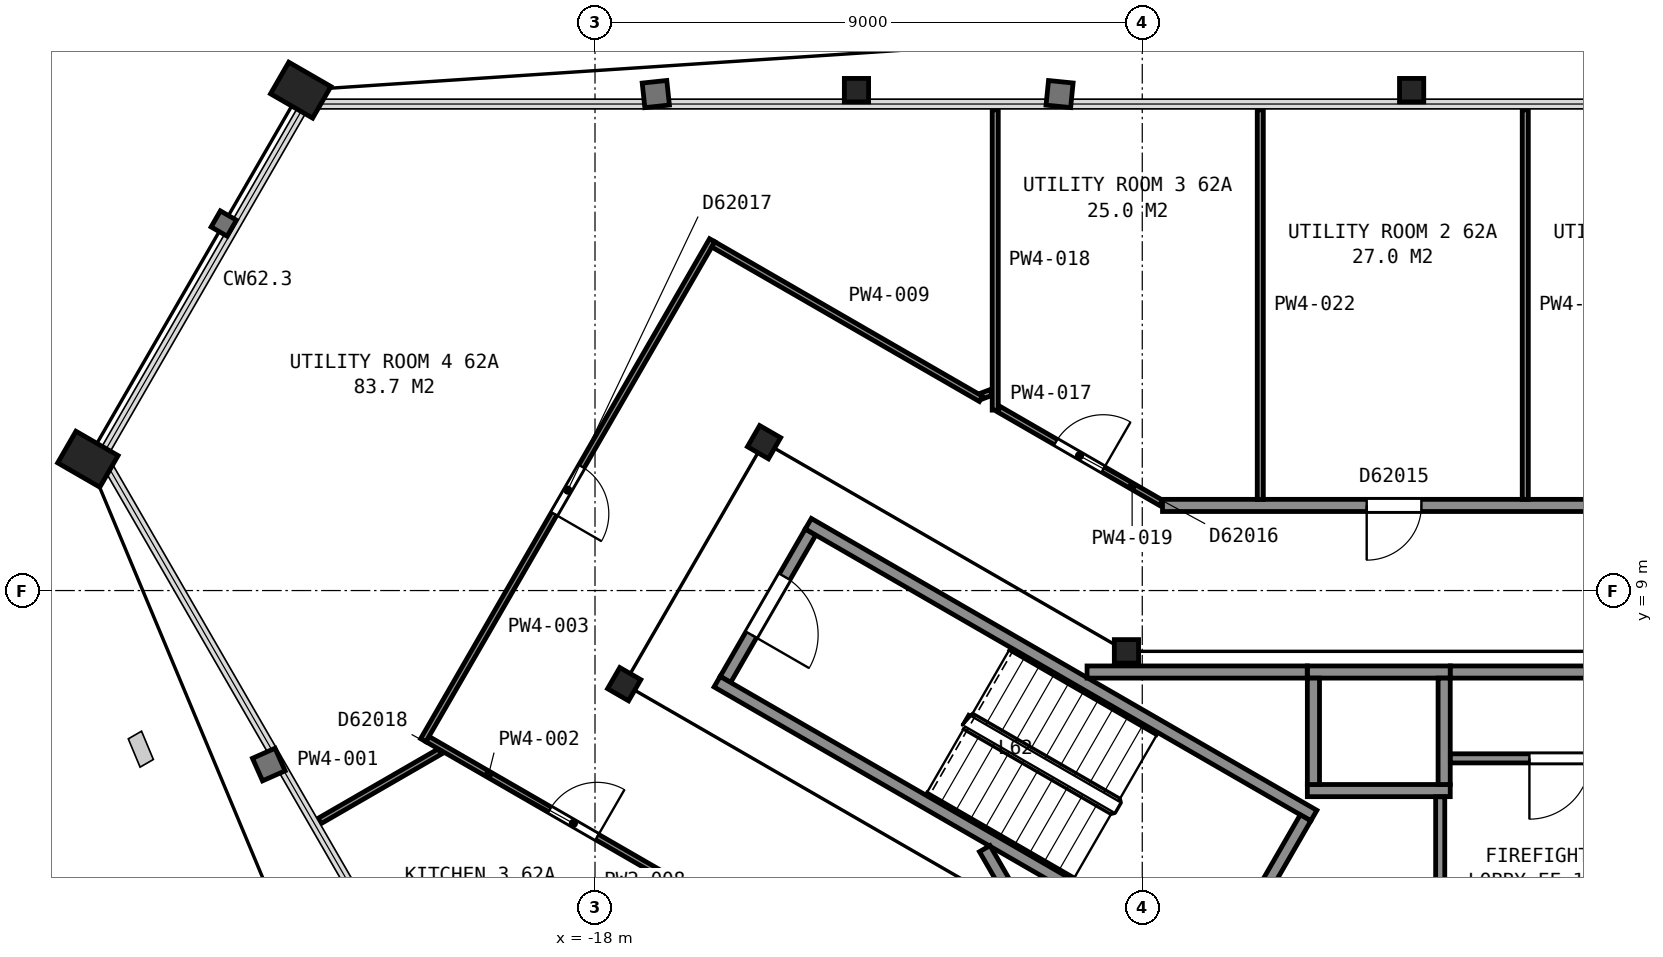
"""IFC4 building model, lengths in metres.
Left out: names, types, materials, properties, quantities, classifications, styles, units other than length and angle.
Written with IfcOpenShell. Run it as: python <this file> out.ifc"""

import sys

from ifc_helpers import new_model, si_unit, direction, frame, frame_2d, origin, origin_2d, place, context, subcontext, project, spatial, rectangle, hollow_rectangle, i_section, extrude, element, fill, save


model = new_model("IFC4")
c1 = context("Model", 3, precision=1e-05, world=origin(), true_north=direction((0.0, 1.0)))
c2 = subcontext(c1, "Body", "Model", "MODEL_VIEW")
j1 = project(units=[si_unit("LENGTHUNIT", "METRE"), si_unit("PLANEANGLEUNIT", "RADIAN")], contexts=[c1])
p1 = place(None, origin())
s1 = spatial("IfcSite", under=j1, at=p1, CompositionType="ELEMENT")
p2 = place(p1, origin())
s2 = spatial("IfcBuilding", under=s1, at=p2, CompositionType="ELEMENT")
p3 = place(p2, frame((0.0, 0.0, 247.1)))
s3 = spatial("IfcBuildingStorey", under=s2, at=p3, CompositionType="ELEMENT", Elevation=247.1)
for number, where, z_axis, x_axis in (
    (1, (-4.57, 17.23, 0.035), (0.0, 0.0, 1.0), (1.0, 0.0, 0.0)),
    (2, (-13.7, 17.23, 0.035), (0.0, 0.0, 1.0), (1.0, 0.0, 0.0)),
):
    element("IfcColumn", number, at=place(p3, frame(where, z_axis=z_axis, x_axis=x_axis)), inside=s3, PredefinedType="COLUMN", context=c2, shape_type="SweptSolid", body=[
        extrude(i_section(OverallWidth=0.399, OverallDepth=0.386, WebThickness=0.021, FlangeThickness=0.033, FilletRadius=0.015, at=origin_2d()), origin(), (0.0, 0.0, 1.0), 3.665),
    ])
for number, where, z_axis, x_axis in (
    (3, (-22.84, 17.23, 0.065), (0.0, 0.0, 1.0), (0.5, 0.866, 0.0)),
    (4, (-26.34, 11.16, 0.065), (0.0, 0.0, 1.0), (0.5, 0.866, 0.0)),
):
    element("IfcColumn", number, at=place(p3, frame(where, z_axis=z_axis, x_axis=x_axis)), inside=s3, PredefinedType="COLUMN", context=c2, shape_type="SweptSolid", body=[
        extrude(hollow_rectangle(XDim=0.6, YDim=0.8, WallThickness=0.05, at=origin_2d()), origin(), (0.0, 0.0, 1.0), 3.635),
    ])
p4 = place(p3, frame((-9.26, 8.0, 0.0), z_axis=(0.0, 0.0, 1.0), x_axis=(1.0, 0.0, 0.0)))
e5 = element("IfcColumn", 5, at=p4, inside=s3, PredefinedType="COLUMN", context=c2, shape_type="SweptSolid", body=[
    extrude(i_section(OverallWidth=0.399, OverallDepth=0.386, WebThickness=0.021, FlangeThickness=0.033, FilletRadius=0.015, at=origin_2d()), origin(), (0.0, 0.0, 1.0), 3.7),
])
for number, where, z_axis, x_axis in (
    (6, (-15.22, 11.44, 0.0), (0.0, 0.0, 1.0), (0.5, 0.866, 0.0)),
    (7, (-17.52, 7.46, 0.0), (0.0, 0.0, 1.0), (0.5, 0.866, 0.0)),
):
    element("IfcColumn", number, at=place(p3, frame(where, z_axis=z_axis, x_axis=x_axis)), inside=s3, PredefinedType="COLUMN", context=c2, shape_type="SweptSolid", body=[
        extrude(i_section(OverallWidth=0.401, OverallDepth=0.399, WebThickness=0.025, FlangeThickness=0.04, FilletRadius=0.015, at=origin_2d()), origin(), (0.0, 0.0, 1.0), 3.7),
    ])
p5 = place(p3, frame((-14.455, 9.962, 0.0), z_axis=(0.0, 0.0, 1.0), x_axis=(-0.500049511043, -0.865996816683, 0.0)))
e8 = element("IfcWall", 8, at=p5, inside=s3, PredefinedType="PARTITIONING", context=c2, shape_type="SweptSolid", body=[
    extrude(rectangle(XDim=2.8, YDim=0.2, at=frame_2d((1.4, 0.0))), origin(), (0.0, 0.0, 1.0), 3.45),
])
p6 = place(p5, frame((0.85, 0.0, 0.0)))
e9 = element("IfcOpeningElement", 9, at=p6, cuts=e8, PredefinedType="OPENING", context=c2, shape_type="SweptSolid", body=[
    extrude(rectangle(XDim=1.1, YDim=2.1, at=frame_2d((0.55, 1.05))), frame((0.0, 0.11, 0.0), z_axis=(0.0, -1.0, 0.0), x_axis=(1.0, 0.0, 0.0)), (0.0, 0.0, 1.0), 0.22),
])
for number, where, z_axis, x_axis in (
    (10, (-7.678, 2.701, 0.0), (0.0, 0.0, 1.0), (-0.866, 0.5, 0.0)),
    (11, (-6.178, 5.299, 0.0), (0.0, 0.0, 1.0), (-0.866, 0.5, 0.0)),
):
    element("IfcWall", number, at=place(p3, frame(where, z_axis=z_axis, x_axis=x_axis)), inside=s3, PredefinedType="PARTITIONING", context=c2, shape_type="SweptSolid", body=[
        extrude(rectangle(XDim=9.6, YDim=0.2, at=frame_2d((4.8, 0.0))), origin(), (0.0, 0.0, 1.0), 3.45),
    ])
p7 = place(p3, frame((-6.315, 5.262, 0.0), z_axis=(0.0, 0.0, 1.0), x_axis=(-0.500049511043, -0.865996816683, 0.0)))
e12 = element("IfcWall", 12, at=p7, inside=s3, PredefinedType="PARTITIONING", context=c2, shape_type="SweptSolid", body=[
    extrude(rectangle(XDim=2.8, YDim=0.2, at=frame_2d((1.4, 0.0))), origin(), (0.0, 0.0, 1.0), 3.45),
])
for number, where, z_axis, x_axis in (
    (13, (-6.285, 5.71, 0.0), (0.0, 0.0, 1.0), (1.0, 0.0, 0.0)),
    (14, (-6.285, 7.66, 0.0), (0.0, 0.0, 1.0), (1.0, 0.0, 0.0)),
):
    element("IfcWall", number, at=place(p3, frame(where, z_axis=z_axis, x_axis=x_axis)), inside=s3, PredefinedType="PARTITIONING", context=c2, shape_type="SweptSolid", body=[
        extrude(rectangle(XDim=2.35, YDim=0.2, at=frame_2d((1.175, 0.0))), origin(), (0.0, 0.0, 1.0), 3.7),
    ])
for number, where, z_axis, x_axis in (
    (15, (-4.035, 5.81, 0.0), (0.0, 0.0, 1.0), (0.0, 1.0, 0.0)),
    (16, (-6.185, 5.81, 0.0), (0.0, 0.0, 1.0), (0.0, 1.0, 0.0)),
):
    element("IfcWall", number, at=place(p3, frame(where, z_axis=z_axis, x_axis=x_axis)), inside=s3, PredefinedType="PARTITIONING", context=c2, shape_type="SweptSolid", body=[
        extrude(rectangle(XDim=1.75, YDim=0.2, at=frame_2d((0.875, 0.0))), origin(), (0.0, 0.0, 1.0), 3.7),
    ])
p8 = place(p3, frame((-11.591, 4.755, 0.0), z_axis=(0.0, 0.0, 1.0), x_axis=(0.500043977787, -0.866000011708, 0.0)))
e17 = element("IfcWall", 17, at=p8, inside=s3, PredefinedType="PARTITIONING", context=c2, shape_type="SweptSolid", body=[
    extrude(rectangle(XDim=6.617, YDim=0.2, at=frame_2d((3.308, 0.0))), origin(), (0.0, 0.0, 1.0), 3.45),
])
p9 = place(p8, frame((3.695, 0.0, 0.0)))
e18 = element("IfcOpeningElement", 18, at=p9, cuts=e17, PredefinedType="OPENING", context=c2, shape_type="SweptSolid", body=[
    extrude(rectangle(XDim=1.8, YDim=2.1, at=frame_2d((0.9, 1.05))), frame((0.0, 0.11, 0.0), z_axis=(0.0, -1.0, 0.0), x_axis=(1.0, 0.0, 0.0)), (0.0, 0.0, 1.0), 0.22),
])
p10 = place(p3, frame((-9.908, 7.66, 0.0), z_axis=(0.0, 0.0, 1.0), x_axis=(1.0, 0.0, 0.0)))
e19 = element("IfcWall", 19, at=p10, inside=s3, PredefinedType="PARTITIONING", context=c2, shape_type="SweptSolid", body=[
    extrude(rectangle(XDim=3.621, YDim=0.2, at=frame_2d((1.811, 0.0))), origin(), (0.0, 0.0, 1.0), 3.45),
])
p11 = place(p3, frame((-4.1, 2.085, 0.0), z_axis=(0.0, 0.0, 1.0), x_axis=(0.0, 1.0, 0.0)))
e20 = element("IfcWall", 20, at=p11, inside=s3, PredefinedType="PARTITIONING", context=c2, shape_type="SweptSolid", body=[
    extrude(rectangle(XDim=3.523, YDim=0.15, at=frame_2d((1.761, 0.0))), origin(), (0.0, 0.0, 1.0), 3.45),
])
p12 = place(p3, frame((-3.933, 6.24, 0.0), z_axis=(0.0, 0.0, 1.0), x_axis=(1.0, 0.0, 0.0)))
e21 = element("IfcWall", 21, at=p12, inside=s3, PredefinedType="PARTITIONING", context=c2, shape_type="SweptSolid", body=[
    extrude(rectangle(XDim=3.538, YDim=0.15, at=frame_2d((1.769, 0.0))), origin(), (0.0, 0.0, 1.0), 3.45),
])
p13 = place(p12, frame((1.3, 0.0, 0.0)))
e22 = element("IfcOpeningElement", 22, at=p13, cuts=e21, PredefinedType="OPENING", context=c2, shape_type="SweptSolid", body=[
    extrude(rectangle(XDim=1.0, YDim=2.1, at=frame_2d((0.5, 1.05))), frame((0.0, 0.085, 0.0), z_axis=(0.0, -1.0, 0.0), x_axis=(1.0, 0.0, 0.0)), (0.0, 0.0, 1.0), 0.17),
])
p14 = place(p3, frame((-3.933, 7.66, 0.0), z_axis=(0.0, 0.0, 1.0), x_axis=(1.0, 0.0, 0.0)))
e23 = element("IfcWall", 23, at=p14, inside=s3, PredefinedType="PARTITIONING", context=c2, shape_type="SweptSolid", body=[
    extrude(rectangle(XDim=13.841, YDim=0.2, at=frame_2d((6.92, 0.0))), origin(), (0.0, 0.0, 1.0), 3.45),
])
p15 = place(p3, frame((-22.53, 5.21, 0.0), z_axis=(0.0, 0.0, 1.0), x_axis=(0.865865073245, 0.500277597875, 0.0)))
e24 = element("IfcWall", 24, at=p15, inside=s3, PredefinedType="PARTITIONING", context=c2, shape_type="SweptSolid", body=[
    extrude(rectangle(XDim=2.284, YDim=0.1, at=frame_2d((1.142, 0.0))), origin(), (0.0, 0.0, 1.0), 2.713),
])
p16 = place(p3, frame((-16.253, 3.957, 0.0), z_axis=(0.0, 0.0, 1.0), x_axis=(-0.866006514596, 0.500032715607, 0.0)))
e25 = element("IfcWall", 25, at=p16, inside=s3, PredefinedType="PARTITIONING", context=c2, shape_type="SweptSolid", body=[
    extrude(rectangle(XDim=5.199, YDim=0.1, at=frame_2d((2.6, 0.0))), origin(), (0.0, 0.0, 1.0), 2.713),
])
p17 = place(p16, frame((1.978, 0.0, 0.0)))
e26 = element("IfcOpeningElement", 26, at=p17, cuts=e25, PredefinedType="OPENING", context=c2, shape_type="SweptSolid", body=[
    extrude(rectangle(XDim=0.9, YDim=2.1, at=frame_2d((0.45, 1.05))), frame((0.0, 0.06, 0.0), z_axis=(0.0, -1.0, 0.0), x_axis=(1.0, 0.0, 0.0)), (0.0, 0.0, 1.0), 0.12),
])
p18 = place(p3, frame((-20.824, 6.539, 0.0), z_axis=(0.0, 0.0, 1.0), x_axis=(0.500297300687, 0.865853689098, 0.0)))
e27 = element("IfcWall", 27, at=p18, inside=s3, PredefinedType="PARTITIONING", context=c2, shape_type="SweptSolid", body=[
    extrude(rectangle(XDim=9.496, YDim=0.1, at=frame_2d((4.748, 0.0))), origin(), (0.0, 0.0, 1.0), 2.713),
])
p19 = place(p18, frame((4.3, 0.0, 0.0)))
e28 = element("IfcOpeningElement", 28, at=p19, cuts=e27, PredefinedType="OPENING", context=c2, shape_type="SweptSolid", body=[
    extrude(rectangle(XDim=0.9, YDim=2.1, at=frame_2d((0.45, 1.05))), frame((0.0, 0.06, 0.0), z_axis=(0.0, -1.0, 0.0), x_axis=(1.0, 0.0, 0.0)), (0.0, 0.0, 1.0), 0.12),
])
p20 = place(p3, frame((-16.055, 14.693, 0.0), z_axis=(0.0, 0.0, 1.0), x_axis=(0.866094383736, -0.499880504182, 0.0)))
e29 = element("IfcWall", 29, at=p20, inside=s3, PredefinedType="PARTITIONING", context=c2, shape_type="SweptSolid", body=[
    extrude(rectangle(XDim=5.081, YDim=0.1, at=frame_2d((2.541, 0.0))), origin(), (0.0, 0.0, 1.0), 2.713),
])
p21 = place(p3, frame((-11.632, 12.203, 0.0), z_axis=(0.0, 0.0, 1.0), x_axis=(0.934710776834, 0.355409290354, 0.0)))
e30 = element("IfcWall", 30, at=p21, inside=s3, PredefinedType="PARTITIONING", context=c2, shape_type="SweptSolid", body=[
    extrude(rectangle(XDim=0.156, YDim=0.1, at=frame_2d((0.078, 0.0))), origin(), (0.0, 0.0, 1.0), 2.713),
])
p22 = place(p3, frame((-11.418, 11.967, 0.0), z_axis=(0.0, 0.0, 1.0), x_axis=(0.0, 1.0, 0.0)))
e31 = element("IfcWall", 31, at=p22, inside=s3, PredefinedType="PARTITIONING", context=c2, shape_type="SweptSolid", body=[
    extrude(rectangle(XDim=4.939, YDim=0.1, at=frame_2d((2.469, 0.0))), origin(), (0.0, 0.0, 1.0), 2.713),
])
p23 = place(p3, frame((-11.357, 11.982, 0.0), z_axis=(0.0, 0.0, 1.0), x_axis=(0.866039032844, -0.499976393034, 0.0)))
e32 = element("IfcWall", 32, at=p23, inside=s3, PredefinedType="PARTITIONING", context=c2, shape_type="SweptSolid", body=[
    extrude(rectangle(XDim=3.079, YDim=0.1, at=frame_2d((1.54, 0.0))), origin(), (0.0, 0.0, 1.0), 2.713),
])
p24 = place(p23, frame((1.08, 0.0, 0.0)))
e33 = element("IfcOpeningElement", 33, at=p24, cuts=e32, PredefinedType="OPENING", context=c2, shape_type="SweptSolid", body=[
    extrude(rectangle(XDim=0.9, YDim=2.1, at=frame_2d((0.45, 1.05))), frame((0.0, 0.06, 0.0), z_axis=(0.0, -1.0, 0.0), x_axis=(1.0, 0.0, 0.0)), (0.0, 0.0, 1.0), 0.12),
])
p25 = place(p3, frame((-8.667, 10.4, 0.0), z_axis=(0.0, 0.0, 1.0), x_axis=(1.0, 0.0, 0.0)))
e34 = element("IfcWall", 34, at=p25, inside=s3, PredefinedType="PARTITIONING", context=c2, shape_type="SweptSolid", body=[
    extrude(rectangle(XDim=17.384, YDim=0.2, at=frame_2d((8.692, 0.0))), origin(), (0.0, 0.0, 1.0), 2.713),
])
p26 = place(p25, frame((12.425, 0.0, 0.0)))
e35 = element("IfcOpeningElement", 35, at=p26, cuts=e34, PredefinedType="OPENING", context=c2, shape_type="SweptSolid", body=[
    extrude(rectangle(XDim=0.9, YDim=2.1, at=frame_2d((0.45, 1.05))), frame((0.0, 0.11, 0.0), z_axis=(0.0, -1.0, 0.0), x_axis=(1.0, 0.0, 0.0)), (0.0, 0.0, 1.0), 0.22),
])
p27 = place(p25, frame((7.716, 0.0, 0.0)))
e36 = element("IfcOpeningElement", 36, at=p27, cuts=e34, PredefinedType="OPENING", context=c2, shape_type="SweptSolid", body=[
    extrude(rectangle(XDim=0.9, YDim=2.1, at=frame_2d((0.45, 1.05))), frame((0.0, 0.11, 0.0), z_axis=(0.0, -1.0, 0.0), x_axis=(1.0, 0.0, 0.0)), (0.0, 0.0, 1.0), 0.22),
])
p28 = place(p25, frame((3.358, 0.0, 0.0)))
e37 = element("IfcOpeningElement", 37, at=p28, cuts=e34, PredefinedType="OPENING", context=c2, shape_type="SweptSolid", body=[
    extrude(rectangle(XDim=0.9, YDim=2.1, at=frame_2d((0.45, 1.05))), frame((0.0, 0.11, 0.0), z_axis=(0.0, -1.0, 0.0), x_axis=(1.0, 0.0, 0.0)), (0.0, 0.0, 1.0), 0.22),
])
for number, where, z_axis, x_axis in (
    (38, (-7.059, 10.5, 0.0), (0.0, 0.0, 1.0), (0.0, 1.0, 0.0)),
    (39, (-2.701, 10.5, 0.0), (0.0, 0.0, 1.0), (0.0, 1.0, 0.0)),
):
    element("IfcWall", number, at=place(p3, frame(where, z_axis=z_axis, x_axis=x_axis)), inside=s3, PredefinedType="PARTITIONING", context=c2, shape_type="SweptSolid", body=[
        extrude(rectangle(XDim=6.406, YDim=0.1, at=frame_2d((3.203, 0.0))), origin(), (0.0, 0.0, 1.0), 2.713),
    ])
p29 = place(p6, origin())
e40 = element("IfcDoor", 40, at=p29, inside=s3, OperationType="SINGLE_SWING_RIGHT", PredefinedType="DOOR", context=c2, shape_type="SweptSolid", body=[
    extrude(rectangle(XDim=1.1, YDim=2.1, at=frame_2d((0.55, 1.05))), frame((0.0, 0.025, 0.0), z_axis=(0.0, -1.0, 0.0), x_axis=(1.0, 0.0, 0.0)), (0.0, 0.0, 1.0), 0.05),
])
fill(e9, e40)
p30 = place(p13, origin())
e41 = element("IfcDoor", 41, at=p30, inside=s3, OperationType="SINGLE_SWING_LEFT", PredefinedType="DOOR", context=c2, shape_type="SweptSolid", body=[
    extrude(rectangle(XDim=1.0, YDim=2.1, at=frame_2d((0.5, 1.05))), frame((0.0, 0.025, 0.0), z_axis=(0.0, -1.0, 0.0), x_axis=(1.0, 0.0, 0.0)), (0.0, 0.0, 1.0), 0.05),
])
fill(e22, e41)
p31 = place(p17, origin())
e42 = element("IfcDoor", 42, at=p31, inside=s3, OperationType="SINGLE_SWING_LEFT", PredefinedType="DOOR", context=c2, shape_type="SweptSolid", body=[
    extrude(rectangle(XDim=0.9, YDim=2.1, at=frame_2d((0.45, 1.05))), frame((0.0, 0.025, 0.0), z_axis=(0.0, -1.0, 0.0), x_axis=(1.0, 0.0, 0.0)), (0.0, 0.0, 1.0), 0.05),
])
fill(e26, e42)
p32 = place(p19, origin())
e43 = element("IfcDoor", 43, at=p32, inside=s3, OperationType="SINGLE_SWING_LEFT", PredefinedType="DOOR", context=c2, shape_type="SweptSolid", body=[
    extrude(rectangle(XDim=0.9, YDim=2.1, at=frame_2d((0.45, 1.05))), frame((0.0, 0.025, 0.0), z_axis=(0.0, -1.0, 0.0), x_axis=(1.0, 0.0, 0.0)), (0.0, 0.0, 1.0), 0.05),
])
fill(e28, e43)
p33 = place(p24, origin())
e44 = element("IfcDoor", 44, at=p33, inside=s3, OperationType="SINGLE_SWING_RIGHT", PredefinedType="DOOR", context=c2, shape_type="SweptSolid", body=[
    extrude(rectangle(XDim=0.9, YDim=2.1, at=frame_2d((0.45, 1.05))), frame((0.0, 0.025, 0.0), z_axis=(0.0, -1.0, 0.0), x_axis=(1.0, 0.0, 0.0)), (0.0, 0.0, 1.0), 0.05),
])
fill(e33, e44)
p34 = place(p28, origin())
e45 = element("IfcDoor", 45, at=p34, inside=s3, OperationType="SINGLE_SWING_LEFT", PredefinedType="DOOR", context=c2, shape_type="SweptSolid", body=[
    extrude(rectangle(XDim=0.9, YDim=2.1, at=frame_2d((0.45, 1.05))), frame((0.0, 0.025, 0.0), z_axis=(0.0, -1.0, 0.0), x_axis=(1.0, 0.0, 0.0)), (0.0, 0.0, 1.0), 0.05),
])
fill(e37, e45)
save(model, sys.argv[1])
